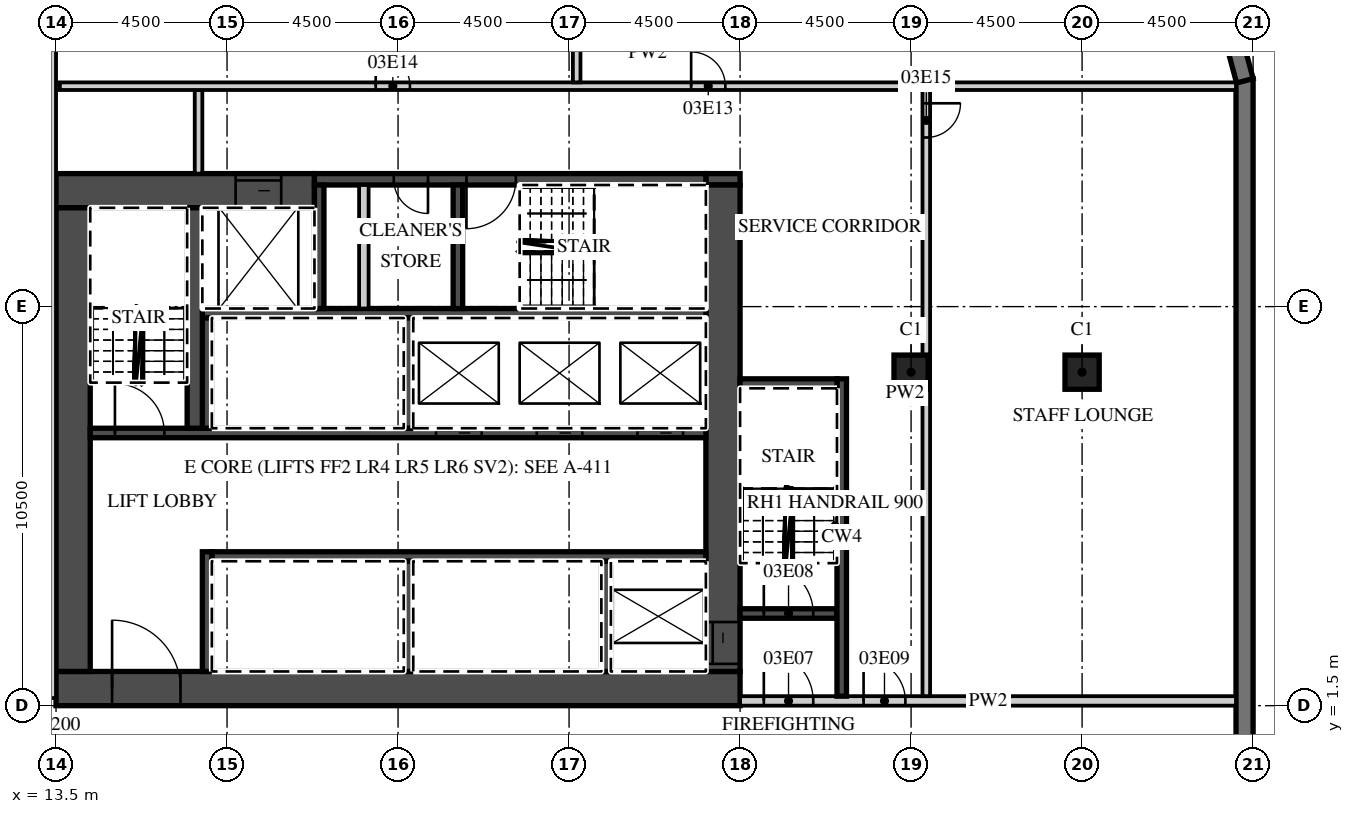
"""IFC4 building model, lengths in metres.
Left out: names, types, materials, properties, quantities, classifications, styles, units other than length and angle.
Written with IfcOpenShell. Run it as: python <this file> out.ifc"""

import sys

from ifc_helpers import new_model, si_unit, direction, frame, frame_2d, origin, origin_2d, place, context, subcontext, project, spatial, polyline, rectangle, outline, extrude, element, fill, save


model = new_model("IFC4")
c1 = context("Model", 3, precision=1e-05, world=origin(), true_north=direction((0.0, 1.0)))
c2 = subcontext(c1, "Body", "Model", "MODEL_VIEW")
j1 = project(units=[si_unit("LENGTHUNIT", "METRE"), si_unit("PLANEANGLEUNIT", "RADIAN")], contexts=[c1])
p1 = place(None, origin())
s1 = spatial("IfcSite", under=j1, at=p1, CompositionType="ELEMENT")
p2 = place(p1, origin())
s2 = spatial("IfcBuilding", under=s1, at=p2, CompositionType="ELEMENT")
p3 = place(p2, frame((0.0, 0.0, 23.5)))
s3 = spatial("IfcBuildingStorey", under=s2, at=p3, CompositionType="ELEMENT", Elevation=23.5)
for number, where, z_axis, x_axis in (
    (1, (36.0, 10.275, 0.0), (0.0, 0.0, 1.0), (1.0, 0.0, 0.0)),
    (2, (40.5, 10.275, 0.0), (0.0, 0.0, 1.0), (1.0, 0.0, 0.0)),
):
    element("IfcColumn", number, at=place(p3, frame(where, z_axis=z_axis, x_axis=x_axis)), inside=s3, PredefinedType="COLUMN", context=c2, shape_type="SweptSolid", body=[
        extrude(rectangle(XDim=0.9, YDim=0.9, at=origin_2d()), origin(), (0.0, 0.0, 1.0), 5.5),
    ])
p4 = place(p3, frame((44.775, -18.0, 0.0), z_axis=(0.0, 0.0, 1.0), x_axis=(0.0, 1.0, 0.0)))
e3 = element("IfcWall", 3, at=p4, inside=s3, PredefinedType="SOLIDWALL", context=c2, shape_type="SweptSolid", body=[
    extrude(rectangle(XDim=36.0, YDim=0.45, at=frame_2d((18.0, 0.0))), origin(), (0.0, 0.0, 1.0), 5.05),
])
p5 = place(p4, frame((4.05, 0.0, 0.9)))
e4 = element("IfcOpeningElement", 4, at=p5, cuts=e3, PredefinedType="OPENING", context=c2, shape_type="SweptSolid", body=[
    extrude(rectangle(XDim=3.0, YDim=1.8, at=frame_2d((1.5, 0.9))), frame((0.0, 0.235, 0.0), z_axis=(0.0, -1.0, 0.0), x_axis=(1.0, 0.0, 0.0)), (0.0, 0.0, 1.0), 0.47),
])
p6 = place(p3, frame((44.783, 17.942, 0.0), z_axis=(0.0, 0.0, 1.0), x_axis=(-0.25881466832, 0.965926999034, 0.0)))
e5 = element("IfcWall", 5, at=p6, inside=s3, PredefinedType="SOLIDWALL", context=c2, shape_type="SweptSolid", body=[
    extrude(outline(polyline([(0.0, -0.225), (2.071, -0.225), (1.95, 0.225), (0.121, 0.225), (0.0, -0.225)])), origin(), (0.0, 0.0, 1.0), 5.05),
])
p7 = place(p3, frame((13.5, 1.95, 0.0), z_axis=(0.0, 0.0, 1.0), x_axis=(1.0, 0.0, 0.0)))
e6 = element("IfcWall", 6, at=p7, inside=s3, PredefinedType="SHEAR", context=c2, shape_type="SweptSolid", body=[
    extrude(rectangle(XDim=18.0, YDim=0.9, at=frame_2d((9.0, 0.0))), origin(), (0.0, 0.0, 1.0), 5.05),
])
p8 = place(p7, frame((1.475, 0.0, 0.0)))
e7 = element("IfcOpeningElement", 7, at=p8, cuts=e6, PredefinedType="OPENING", context=c2, shape_type="SweptSolid", body=[
    extrude(rectangle(XDim=1.8, YDim=2.1, at=frame_2d((0.9, 1.05))), frame((0.0, 0.46, 0.0), z_axis=(0.0, -1.0, 0.0), x_axis=(1.0, 0.0, 0.0)), (0.0, 0.0, 1.0), 0.92),
])
p9 = place(p3, frame((13.5, 15.05, 0.0), z_axis=(0.0, 0.0, 1.0), x_axis=(1.0, 0.0, 0.0)))
e8 = element("IfcWall", 8, at=p9, inside=s3, PredefinedType="SHEAR", context=c2, shape_type="SweptSolid", body=[
    extrude(rectangle(XDim=6.8, YDim=0.9, at=frame_2d((3.4, 0.0))), origin(), (0.0, 0.0, 1.0), 5.05),
])
p10 = place(p9, frame((4.725, 0.0, 0.0)))
e9 = element("IfcOpeningElement", 9, at=p10, cuts=e8, PredefinedType="OPENING", context=c2, shape_type="SweptSolid", body=[
    extrude(rectangle(XDim=1.2, YDim=2.1, at=frame_2d((0.6, 1.05))), frame((0.0, 0.46, 0.0), z_axis=(0.0, -1.0, 0.0), x_axis=(1.0, 0.0, 0.0)), (0.0, 0.0, 1.0), 0.92),
])
p11 = place(p3, frame((30.6, 15.35, 0.0), z_axis=(0.0, 0.0, 1.0), x_axis=(1.0, 0.0, 0.0)))
e10 = element("IfcWall", 10, at=p11, inside=s3, PredefinedType="SHEAR", context=c2, shape_type="SweptSolid", body=[
    extrude(rectangle(XDim=0.9, YDim=0.3, at=frame_2d((0.45, 0.0))), origin(), (0.0, 0.0, 1.0), 5.05),
])
p12 = place(p3, frame((20.3, 15.35, 0.0), z_axis=(0.0, 0.0, 1.0), x_axis=(1.0, 0.0, 0.0)))
e11 = element("IfcWall", 11, at=p12, inside=s3, PredefinedType="SHEAR", context=c2, shape_type="SweptSolid", body=[
    extrude(rectangle(XDim=10.3, YDim=0.3, at=frame_2d((5.15, 0.0))), origin(), (0.0, 0.0, 1.0), 5.05),
])
p13 = place(p12, frame((4.0, 0.0, 0.0)))
e12 = element("IfcOpeningElement", 12, at=p13, cuts=e11, PredefinedType="OPENING", context=c2, shape_type="SweptSolid", body=[
    extrude(rectangle(XDim=1.3, YDim=2.1, at=frame_2d((0.65, 1.05))), frame((0.0, 0.16, 0.0), z_axis=(0.0, -1.0, 0.0), x_axis=(1.0, 0.0, 0.0)), (0.0, 0.0, 1.0), 0.32),
])
p14 = place(p12, frame((2.087, 0.0, 0.0)))
e13 = element("IfcOpeningElement", 13, at=p14, cuts=e11, PredefinedType="OPENING", context=c2, shape_type="SweptSolid", body=[
    extrude(rectangle(XDim=0.9, YDim=2.1, at=frame_2d((0.45, 1.05))), frame((0.0, 0.16, 0.0), z_axis=(0.0, -1.0, 0.0), x_axis=(1.0, 0.0, 0.0)), (0.0, 0.0, 1.0), 0.32),
])
p15 = place(p3, frame((31.05, 2.4, 0.0), z_axis=(0.0, 0.0, 1.0), x_axis=(0.0, 1.0, 0.0)))
e14 = element("IfcWall", 14, at=p15, inside=s3, PredefinedType="SHEAR", context=c2, shape_type="SweptSolid", body=[
    extrude(rectangle(XDim=12.8, YDim=0.9, at=frame_2d((6.4, 0.0))), origin(), (0.0, 0.0, 1.0), 5.05),
])
p16 = place(p15, frame((0.2, 0.0, 0.0)))
e15 = element("IfcOpeningElement", 15, at=p16, cuts=e14, PredefinedType="OPENING", context=c2, shape_type="SweptSolid", body=[
    extrude(rectangle(XDim=1.1, YDim=2.1, at=frame_2d((0.55, 1.05))), frame((0.0, 0.46, 0.0), z_axis=(0.0, -1.0, 0.0), x_axis=(1.0, 0.0, 0.0)), (0.0, 0.0, 1.0), 0.92),
])
p17 = place(p3, frame((13.95, 2.4, 0.0), z_axis=(0.0, 0.0, 1.0), x_axis=(0.0, 1.0, 0.0)))
e16 = element("IfcWall", 16, at=p17, inside=s3, PredefinedType="SHEAR", context=c2, shape_type="SweptSolid", body=[
    extrude(rectangle(XDim=12.2, YDim=0.9, at=frame_2d((6.1, 0.0))), origin(), (0.0, 0.0, 1.0), 5.05),
])
p18 = place(p3, frame((17.6, 5.425, 0.0), z_axis=(0.0, 0.0, 1.0), x_axis=(1.0, 0.0, 0.0)))
e17 = element("IfcWall", 17, at=p18, inside=s3, PredefinedType="SHEAR", context=c2, shape_type="SweptSolid", body=[
    extrude(rectangle(XDim=13.0, YDim=0.25, at=frame_2d((6.5, 0.0))), origin(), (0.0, 0.0, 1.0), 5.05),
])
p19 = place(p3, frame((17.475, 2.4, 0.0), z_axis=(0.0, 0.0, 1.0), x_axis=(0.0, 1.0, 0.0)))
e18 = element("IfcWall", 18, at=p19, inside=s3, PredefinedType="SHEAR", context=c2, shape_type="SweptSolid", body=[
    extrude(rectangle(XDim=3.15, YDim=0.25, at=frame_2d((1.575, 0.0))), origin(), (0.0, 0.0, 1.0), 5.05),
])
for number, where, z_axis, x_axis in (
    (19, (27.975, 2.4, 0.0), (0.0, 0.0, 1.0), (0.0, 1.0, 0.0)),
    (20, (22.775, 2.4, 0.0), (0.0, 0.0, 1.0), (0.0, 1.0, 0.0)),
):
    element("IfcWall", number, at=place(p3, frame(where, z_axis=z_axis, x_axis=x_axis)), inside=s3, PredefinedType="SHEAR", context=c2, shape_type="SweptSolid", body=[
        extrude(rectangle(XDim=2.9, YDim=0.25, at=frame_2d((1.45, 0.0))), origin(), (0.0, 0.0, 1.0), 5.05),
    ])
p20 = place(p3, frame((14.4, 8.675, 0.0), z_axis=(0.0, 0.0, 1.0), x_axis=(1.0, 0.0, 0.0)))
e21 = element("IfcWall", 21, at=p20, inside=s3, PredefinedType="SHEAR", context=c2, shape_type="SweptSolid", body=[
    extrude(rectangle(XDim=16.2, YDim=0.25, at=frame_2d((8.1, 0.0))), origin(), (0.0, 0.0, 1.0), 5.05),
])
p21 = place(p20, frame((14.4, 0.0, 0.0)))
e22 = element("IfcOpeningElement", 22, at=p21, cuts=e21, PredefinedType="OPENING", context=c2, shape_type="SweptSolid", body=[
    extrude(rectangle(XDim=1.2, YDim=2.1, at=frame_2d((0.6, 1.05))), frame((0.0, 0.135, 0.0), z_axis=(0.0, -1.0, 0.0), x_axis=(1.0, 0.0, 0.0)), (0.0, 0.0, 1.0), 0.27),
])
p22 = place(p20, frame((11.75, 0.0, 0.0)))
e23 = element("IfcOpeningElement", 23, at=p22, cuts=e21, PredefinedType="OPENING", context=c2, shape_type="SweptSolid", body=[
    extrude(rectangle(XDim=1.2, YDim=2.1, at=frame_2d((0.6, 1.05))), frame((0.0, 0.135, 0.0), z_axis=(0.0, -1.0, 0.0), x_axis=(1.0, 0.0, 0.0)), (0.0, 0.0, 1.0), 0.27),
])
p23 = place(p20, frame((9.1, 0.0, 0.0)))
e24 = element("IfcOpeningElement", 24, at=p23, cuts=e21, PredefinedType="OPENING", context=c2, shape_type="SweptSolid", body=[
    extrude(rectangle(XDim=1.2, YDim=2.1, at=frame_2d((0.6, 1.05))), frame((0.0, 0.135, 0.0), z_axis=(0.0, -1.0, 0.0), x_axis=(1.0, 0.0, 0.0)), (0.0, 0.0, 1.0), 0.27),
])
p24 = place(p20, frame((0.65, 0.0, 0.0)))
e25 = element("IfcOpeningElement", 25, at=p24, cuts=e21, PredefinedType="OPENING", context=c2, shape_type="SweptSolid", body=[
    extrude(rectangle(XDim=1.3, YDim=2.1, at=frame_2d((0.65, 1.05))), frame((0.0, 0.135, 0.0), z_axis=(0.0, -1.0, 0.0), x_axis=(1.0, 0.0, 0.0)), (0.0, 0.0, 1.0), 0.27),
])
p25 = place(p3, frame((17.35, 11.825, 0.0), z_axis=(0.0, 0.0, 1.0), x_axis=(1.0, 0.0, 0.0)))
e26 = element("IfcWall", 26, at=p25, inside=s3, PredefinedType="SHEAR", context=c2, shape_type="SweptSolid", body=[
    extrude(rectangle(XDim=13.25, YDim=0.25, at=frame_2d((6.625, 0.0))), origin(), (0.0, 0.0, 1.0), 5.05),
])
for number, where, z_axis, x_axis in (
    (27, (17.475, 8.8, 0.0), (0.0, 0.0, 1.0), (0.0, 1.0, 0.0)),
    (28, (22.775, 8.8, 0.0), (0.0, 0.0, 1.0), (0.0, 1.0, 0.0)),
):
    element("IfcWall", number, at=place(p3, frame(where, z_axis=z_axis, x_axis=x_axis)), inside=s3, PredefinedType="SHEAR", context=c2, shape_type="SweptSolid", body=[
        extrude(rectangle(XDim=2.9, YDim=0.25, at=frame_2d((1.45, 0.0))), origin(), (0.0, 0.0, 1.0), 5.05),
    ])
p26 = place(p3, frame((17.15, 8.8, 0.0), z_axis=(0.0, 0.0, 1.0), x_axis=(0.0, 1.0, 0.0)))
e29 = element("IfcWall", 29, at=p26, inside=s3, PredefinedType="SHEAR", context=c2, shape_type="SweptSolid", body=[
    extrude(rectangle(XDim=5.8, YDim=0.4, at=frame_2d((2.9, 0.0))), origin(), (0.0, 0.0, 1.0), 5.05),
])
for number, where, z_axis, x_axis in (
    (30, (20.425, 11.95, 0.0), (0.0, 0.0, 1.0), (0.0, 1.0, 0.0)),
    (31, (24.075, 11.95, 0.0), (0.0, 0.0, 1.0), (0.0, 1.0, 0.0)),
):
    element("IfcWall", number, at=place(p3, frame(where, z_axis=z_axis, x_axis=x_axis)), inside=s3, PredefinedType="SHEAR", context=c2, shape_type="SweptSolid", body=[
        extrude(rectangle(XDim=3.25, YDim=0.25, at=frame_2d((1.625, 0.0))), origin(), (0.0, 0.0, 1.0), 5.05),
    ])
p27 = place(p3, frame((21.6, 11.95, 0.0), z_axis=(0.0, 0.0, 1.0), x_axis=(0.0, 1.0, 0.0)))
e32 = element("IfcWall", 32, at=p27, inside=s3, PredefinedType="PARTITIONING", context=c2, shape_type="SweptSolid", body=[
    extrude(rectangle(XDim=3.25, YDim=0.25, at=frame_2d((1.625, 0.0))), origin(), (0.0, 0.0, 1.0), 5.05),
])
p28 = place(p3, frame((31.5, 1.625, 0.0), z_axis=(0.0, 0.0, 1.0), x_axis=(1.0, 0.0, 0.0)))
e33 = element("IfcWall", 33, at=p28, inside=s3, PredefinedType="PARTITIONING", context=c2, shape_type="SweptSolid", body=[
    extrude(rectangle(XDim=13.05, YDim=0.25, at=frame_2d((6.525, 0.0))), origin(), (0.0, 0.0, 1.0), 5.05),
])
p29 = place(p28, frame((0.625, 0.0, 0.0)))
e34 = element("IfcOpeningElement", 34, at=p29, cuts=e33, PredefinedType="OPENING", context=c2, shape_type="SweptSolid", body=[
    extrude(rectangle(XDim=1.3, YDim=2.1, at=frame_2d((0.65, 1.05))), frame((0.0, 0.135, 0.0), z_axis=(0.0, -1.0, 0.0), x_axis=(1.0, 0.0, 0.0)), (0.0, 0.0, 1.0), 0.27),
])
p30 = place(p28, frame((3.25, 0.0, 0.0)))
e35 = element("IfcOpeningElement", 35, at=p30, cuts=e33, PredefinedType="OPENING", context=c2, shape_type="SweptSolid", body=[
    extrude(rectangle(XDim=1.1, YDim=2.1, at=frame_2d((0.55, 1.05))), frame((0.0, 0.135, 0.0), z_axis=(0.0, -1.0, 0.0), x_axis=(1.0, 0.0, 0.0)), (0.0, 0.0, 1.0), 0.27),
])
p31 = place(p3, frame((31.5, 3.925, 0.0), z_axis=(0.0, 0.0, 1.0), x_axis=(1.0, 0.0, 0.0)))
e36 = element("IfcWall", 36, at=p31, inside=s3, PredefinedType="SHEAR", context=c2, shape_type="SweptSolid", body=[
    extrude(rectangle(XDim=2.55, YDim=0.25, at=frame_2d((1.275, 0.0))), origin(), (0.0, 0.0, 1.0), 5.05),
])
p32 = place(p31, frame((0.625, 0.0, 0.0)))
e37 = element("IfcOpeningElement", 37, at=p32, cuts=e36, PredefinedType="OPENING", context=c2, shape_type="SweptSolid", body=[
    extrude(rectangle(XDim=1.3, YDim=2.1, at=frame_2d((0.65, 1.05))), frame((0.0, 0.135, 0.0), z_axis=(0.0, -1.0, 0.0), x_axis=(1.0, 0.0, 0.0)), (0.0, 0.0, 1.0), 0.27),
])
p33 = place(p3, frame((34.175, 1.75, 0.0), z_axis=(0.0, 0.0, 1.0), x_axis=(0.0, 1.0, 0.0)))
e38 = element("IfcWall", 38, at=p33, inside=s3, PredefinedType="SHEAR", context=c2, shape_type="SweptSolid", body=[
    extrude(rectangle(XDim=8.35, YDim=0.25, at=frame_2d((4.175, 0.0))), origin(), (0.0, 0.0, 1.0), 5.05),
])
p34 = place(p3, frame((31.5, 9.975, 0.0), z_axis=(0.0, 0.0, 1.0), x_axis=(1.0, 0.0, 0.0)))
e39 = element("IfcWall", 39, at=p34, inside=s3, PredefinedType="SHEAR", context=c2, shape_type="SweptSolid", body=[
    extrude(rectangle(XDim=2.55, YDim=0.25, at=frame_2d((1.275, 0.0))), origin(), (0.0, 0.0, 1.0), 5.05),
])
p35 = place(p3, frame((17.25, 15.5, 0.0), z_axis=(0.0, 0.0, 1.0), x_axis=(0.0, 1.0, 0.0)))
e40 = element("IfcWall", 40, at=p35, inside=s3, PredefinedType="PARTITIONING", context=c2, shape_type="SweptSolid", body=[
    extrude(rectangle(XDim=2.2, YDim=0.2, at=frame_2d((1.1, 0.0))), origin(), (0.0, 0.0, 1.0), 5.05),
])
p36 = place(p3, frame((36.4, 1.75, 0.0), z_axis=(0.0, 0.0, 1.0), x_axis=(0.0, 1.0, 0.0)))
e41 = element("IfcWall", 41, at=p36, inside=s3, PredefinedType="PARTITIONING", context=c2, shape_type="SweptSolid", body=[
    extrude(rectangle(XDim=15.95, YDim=0.2, at=frame_2d((7.975, 0.0))), origin(), (0.0, 0.0, 1.0), 5.05),
])
p37 = place(p36, frame((14.7, 0.0, 0.0)))
e42 = element("IfcOpeningElement", 42, at=p37, cuts=e41, PredefinedType="OPENING", context=c2, shape_type="SweptSolid", body=[
    extrude(rectangle(XDim=0.9, YDim=2.1, at=frame_2d((0.45, 1.05))), frame((0.0, 0.11, 0.0), z_axis=(0.0, -1.0, 0.0), x_axis=(1.0, 0.0, 0.0)), (0.0, 0.0, 1.0), 0.22),
])
p38 = place(p3, frame((13.6, 17.8, 0.0), z_axis=(0.0, 0.0, 1.0), x_axis=(1.0, 0.0, 0.0)))
e43 = element("IfcWall", 43, at=p38, inside=s3, PredefinedType="PARTITIONING", context=c2, shape_type="SweptSolid", body=[
    extrude(rectangle(XDim=30.95, YDim=0.2, at=frame_2d((15.475, 0.0))), origin(), (0.0, 0.0, 1.0), 5.05),
])
p39 = place(p38, frame((16.613, 0.0, 0.0)))
e44 = element("IfcOpeningElement", 44, at=p39, cuts=e43, PredefinedType="OPENING", context=c2, shape_type="SweptSolid", body=[
    extrude(rectangle(XDim=0.9, YDim=2.1, at=frame_2d((0.45, 1.05))), frame((0.0, 0.11, 0.0), z_axis=(0.0, -1.0, 0.0), x_axis=(1.0, 0.0, 0.0)), (0.0, 0.0, 1.0), 0.22),
])
p40 = place(p38, frame((8.312, 0.0, 0.0)))
e45 = element("IfcOpeningElement", 45, at=p40, cuts=e43, PredefinedType="OPENING", context=c2, shape_type="SweptSolid", body=[
    extrude(rectangle(XDim=0.9, YDim=2.1, at=frame_2d((0.45, 1.05))), frame((0.0, 0.11, 0.0), z_axis=(0.0, -1.0, 0.0), x_axis=(1.0, 0.0, 0.0)), (0.0, 0.0, 1.0), 0.22),
])
p41 = place(p3, frame((27.2, 17.9, 0.0), z_axis=(0.0, 0.0, 1.0), x_axis=(0.0, 1.0, 0.0)))
e46 = element("IfcWall", 46, at=p41, inside=s3, PredefinedType="PARTITIONING", context=c2, shape_type="SweptSolid", body=[
    extrude(rectangle(XDim=3.65, YDim=0.2, at=frame_2d((1.825, 0.0))), origin(), (0.0, 0.0, 1.0), 5.05),
])
p42 = place(p3, frame((13.4, 1.7, 0.0), z_axis=(0.0, 0.0, 1.0), x_axis=(0.0, 1.0, 0.0)))
e47 = element("IfcWall", 47, at=p42, inside=s3, PredefinedType="PARTITIONING", context=c2, shape_type="SweptSolid", body=[
    extrude(rectangle(XDim=20.15, YDim=0.2, at=frame_2d((10.075, 0.0))), origin(), (0.0, 0.0, 1.0), 5.05),
])
p43 = place(p21, origin())
e48 = element("IfcDoor", 48, at=p43, inside=s3, OperationType="SLIDING_TO_LEFT", PredefinedType="DOOR", context=c2, shape_type="SweptSolid", body=[
    extrude(rectangle(XDim=1.2, YDim=2.1, at=frame_2d((0.6, 1.05))), frame((0.0, 0.025, 0.0), z_axis=(0.0, -1.0, 0.0), x_axis=(1.0, 0.0, 0.0)), (0.0, 0.0, 1.0), 0.05),
])
fill(e22, e48)
p44 = place(p22, origin())
e49 = element("IfcDoor", 49, at=p44, inside=s3, OperationType="SLIDING_TO_RIGHT", PredefinedType="DOOR", context=c2, shape_type="SweptSolid", body=[
    extrude(rectangle(XDim=1.2, YDim=2.1, at=frame_2d((0.6, 1.05))), frame((0.0, 0.025, 0.0), z_axis=(0.0, -1.0, 0.0), x_axis=(1.0, 0.0, 0.0)), (0.0, 0.0, 1.0), 0.05),
])
fill(e23, e49)
p45 = place(p23, origin())
e50 = element("IfcDoor", 50, at=p45, inside=s3, OperationType="SLIDING_TO_RIGHT", PredefinedType="DOOR", context=c2, shape_type="SweptSolid", body=[
    extrude(rectangle(XDim=1.2, YDim=2.1, at=frame_2d((0.6, 1.05))), frame((0.0, 0.025, 0.0), z_axis=(0.0, -1.0, 0.0), x_axis=(1.0, 0.0, 0.0)), (0.0, 0.0, 1.0), 0.05),
])
fill(e24, e50)
p46 = place(p10, origin())
e51 = element("IfcDoor", 51, at=p46, inside=s3, OperationType="SLIDING_TO_LEFT", PredefinedType="DOOR", context=c2, shape_type="SweptSolid", body=[
    extrude(rectangle(XDim=1.2, YDim=2.1, at=frame_2d((0.6, 1.05))), frame((0.0, 0.025, 0.0), z_axis=(0.0, -1.0, 0.0), x_axis=(1.0, 0.0, 0.0)), (0.0, 0.0, 1.0), 0.05),
])
fill(e9, e51)
p47 = place(p16, origin())
e52 = element("IfcDoor", 52, at=p47, inside=s3, OperationType="SLIDING_TO_LEFT", PredefinedType="DOOR", context=c2, shape_type="SweptSolid", body=[
    extrude(rectangle(XDim=1.1, YDim=2.1, at=frame_2d((0.55, 1.05))), frame((0.0, 0.025, 0.0), z_axis=(0.0, -1.0, 0.0), x_axis=(1.0, 0.0, 0.0)), (0.0, 0.0, 1.0), 0.05),
])
fill(e15, e52)
p48 = place(p8, origin())
e53 = element("IfcDoor", 53, at=p48, inside=s3, OperationType="DOUBLE_DOOR_DOUBLE_SWING", PredefinedType="DOOR", context=c2, shape_type="SweptSolid", body=[
    extrude(rectangle(XDim=1.8, YDim=2.1, at=frame_2d((0.9, 1.05))), frame((0.0, 0.025, 0.0), z_axis=(0.0, -1.0, 0.0), x_axis=(1.0, 0.0, 0.0)), (0.0, 0.0, 1.0), 0.05),
])
fill(e7, e53)
p49 = place(p29, origin())
e54 = element("IfcDoor", 54, at=p49, inside=s3, OperationType="SINGLE_SWING_LEFT", PredefinedType="DOOR", context=c2, shape_type="SweptSolid", body=[
    extrude(rectangle(XDim=1.3, YDim=2.1, at=frame_2d((0.65, 1.05))), frame((0.0, 0.025, 0.0), z_axis=(0.0, -1.0, 0.0), x_axis=(1.0, 0.0, 0.0)), (0.0, 0.0, 1.0), 0.05),
])
fill(e34, e54)
p50 = place(p32, origin())
e55 = element("IfcDoor", 55, at=p50, inside=s3, OperationType="SINGLE_SWING_LEFT", PredefinedType="DOOR", context=c2, shape_type="SweptSolid", body=[
    extrude(rectangle(XDim=1.3, YDim=2.1, at=frame_2d((0.65, 1.05))), frame((0.0, 0.025, 0.0), z_axis=(0.0, -1.0, 0.0), x_axis=(1.0, 0.0, 0.0)), (0.0, 0.0, 1.0), 0.05),
])
fill(e37, e55)
p51 = place(p30, origin())
e56 = element("IfcDoor", 56, at=p51, inside=s3, OperationType="SINGLE_SWING_LEFT", PredefinedType="DOOR", context=c2, shape_type="SweptSolid", body=[
    extrude(rectangle(XDim=1.1, YDim=2.1, at=frame_2d((0.55, 1.05))), frame((0.0, 0.025, 0.0), z_axis=(0.0, -1.0, 0.0), x_axis=(1.0, 0.0, 0.0)), (0.0, 0.0, 1.0), 0.05),
])
fill(e35, e56)
p52 = place(p24, origin())
e57 = element("IfcDoor", 57, at=p52, inside=s3, OperationType="SINGLE_SWING_LEFT", PredefinedType="DOOR", context=c2, shape_type="SweptSolid", body=[
    extrude(rectangle(XDim=1.3, YDim=2.1, at=frame_2d((0.65, 1.05))), frame((0.0, 0.025, 0.0), z_axis=(0.0, -1.0, 0.0), x_axis=(1.0, 0.0, 0.0)), (0.0, 0.0, 1.0), 0.05),
])
fill(e25, e57)
p53 = place(p13, origin())
e58 = element("IfcDoor", 58, at=p53, inside=s3, OperationType="SINGLE_SWING_LEFT", PredefinedType="DOOR", context=c2, shape_type="SweptSolid", body=[
    extrude(rectangle(XDim=1.3, YDim=2.1, at=frame_2d((0.65, 1.05))), frame((0.0, 0.025, 0.0), z_axis=(0.0, -1.0, 0.0), x_axis=(1.0, 0.0, 0.0)), (0.0, 0.0, 1.0), 0.05),
])
fill(e12, e58)
p54 = place(p14, origin())
e59 = element("IfcDoor", 59, at=p54, inside=s3, OperationType="SINGLE_SWING_RIGHT", PredefinedType="DOOR", context=c2, shape_type="SweptSolid", body=[
    extrude(rectangle(XDim=0.9, YDim=2.1, at=frame_2d((0.45, 1.05))), frame((0.0, 0.025, 0.0), z_axis=(0.0, -1.0, 0.0), x_axis=(1.0, 0.0, 0.0)), (0.0, 0.0, 1.0), 0.05),
])
fill(e13, e59)
p55 = place(p39, origin())
e60 = element("IfcDoor", 60, at=p55, inside=s3, OperationType="SINGLE_SWING_LEFT", PredefinedType="DOOR", context=c2, shape_type="SweptSolid", body=[
    extrude(rectangle(XDim=0.9, YDim=2.1, at=frame_2d((0.45, 1.05))), frame((0.0, 0.025, 0.0), z_axis=(0.0, -1.0, 0.0), x_axis=(1.0, 0.0, 0.0)), (0.0, 0.0, 1.0), 0.05),
])
fill(e44, e60)
p56 = place(p40, origin())
e61 = element("IfcDoor", 61, at=p56, inside=s3, OperationType="SINGLE_SWING_LEFT", PredefinedType="DOOR", context=c2, shape_type="SweptSolid", body=[
    extrude(rectangle(XDim=0.9, YDim=2.1, at=frame_2d((0.45, 1.05))), frame((0.0, 0.025, 0.0), z_axis=(0.0, -1.0, 0.0), x_axis=(1.0, 0.0, 0.0)), (0.0, 0.0, 1.0), 0.05),
])
fill(e45, e61)
p57 = place(p37, origin())
e62 = element("IfcDoor", 62, at=p57, inside=s3, OperationType="SINGLE_SWING_RIGHT", PredefinedType="DOOR", context=c2, shape_type="SweptSolid", body=[
    extrude(rectangle(XDim=0.9, YDim=2.1, at=frame_2d((0.45, 1.05))), frame((0.0, 0.025, 0.0), z_axis=(0.0, -1.0, 0.0), x_axis=(1.0, 0.0, 0.0)), (0.0, 0.0, 1.0), 0.05),
])
fill(e42, e62)
save(model, sys.argv[1])
